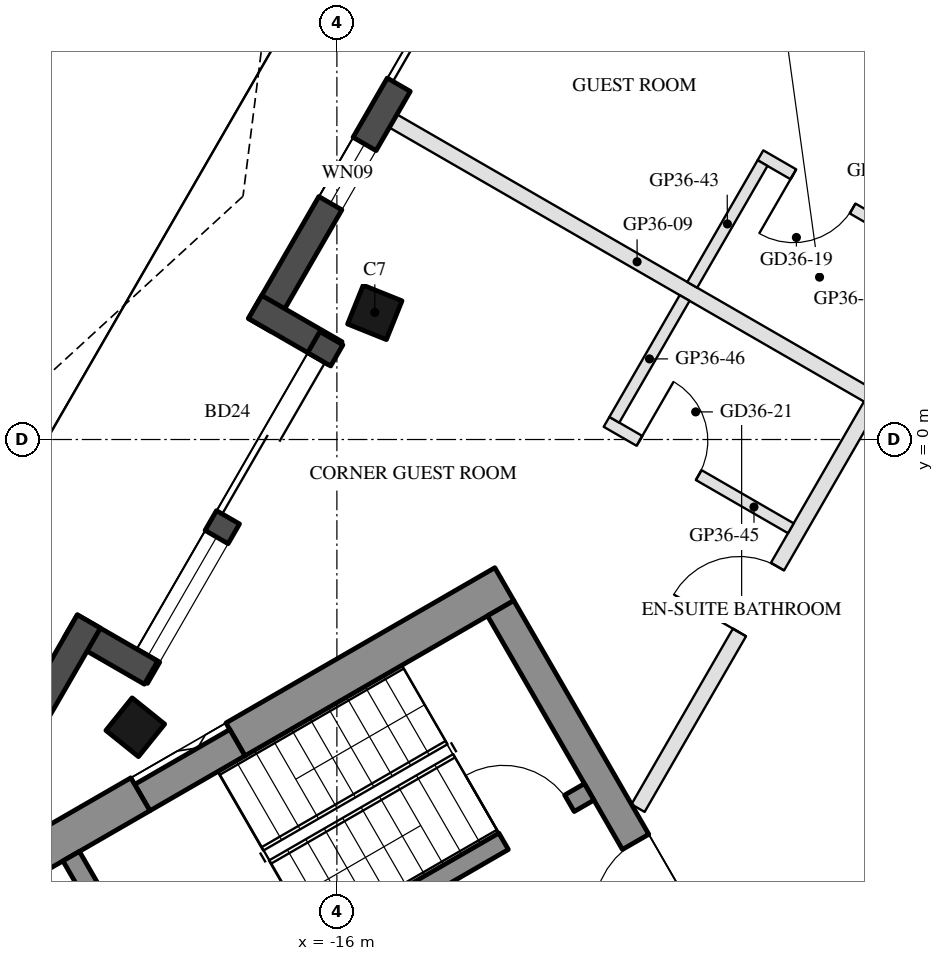
"""IFC4 building model, lengths in metres.
Left out: names, types, materials, properties, quantities, classifications, styles, units other than length and angle.
Written with IfcOpenShell. Run it as: python <this file> out.ifc"""

import sys

from ifc_helpers import new_model, si_unit, direction, frame, frame_2d, origin, origin_2d, place, context, subcontext, project, spatial, rectangle, hollow_rectangle, extrude, boolean, halfspace, element, fill, save


model = new_model("IFC4")
c1 = context("Model", 3, precision=1e-05, world=origin(), true_north=direction((0.0, 1.0)))
c2 = subcontext(c1, "Body", "Model", "MODEL_VIEW")
j1 = project(units=[si_unit("LENGTHUNIT", "METRE"), si_unit("PLANEANGLEUNIT", "RADIAN")], contexts=[c1])
p1 = place(None, origin())
s1 = spatial("IfcSite", under=j1, at=p1, CompositionType="ELEMENT")
p2 = place(p1, origin())
s2 = spatial("IfcBuilding", under=s1, at=p2, CompositionType="ELEMENT")
p3 = place(p2, frame((0.0, 0.0, 328.1)))
s3 = spatial("IfcBuildingStorey", under=s2, at=p3, CompositionType="ELEMENT", Elevation=328.1)
p4 = place(p3, frame((-15.501, 1.672, 0.0), z_axis=(0.161451925123, -0.022915757114, 0.986614485982), x_axis=(-0.495072298274, -0.866715969634, 0.060883885081)))
e1 = element("IfcColumn", 1, at=p4, inside=s3, PredefinedType="COLUMN", context=c2, shape_type="SweptSolid", body=[
    boolean("DIFFERENCE", boolean("DIFFERENCE", extrude(hollow_rectangle(XDim=0.55, YDim=0.55, WallThickness=0.025, at=origin_2d()), origin(), (0.0, 0.0, 1.0), 3.75), halfspace(frame((0.0, 0.0, 0.034), z_axis=(0.0, 0.0, 1.0), x_axis=(1.0, 0.0, 0.0)), True)), halfspace(frame((0.0, 0.0, 3.735), z_axis=(0.0, 0.0, 1.0), x_axis=(1.0, 0.0, 0.0)), False)),
])
p5 = place(p3, frame((-18.652, -3.786, 0.0), z_axis=(0.190735837279, 0.02958801006, 0.981195388309), x_axis=(-0.488607938484, -0.864067297741, 0.121037132421)))
e2 = element("IfcColumn", 2, at=p5, inside=s3, PredefinedType="COLUMN", context=c2, shape_type="SweptSolid", body=[
    boolean("DIFFERENCE", boolean("DIFFERENCE", extrude(hollow_rectangle(XDim=0.55, YDim=0.55, WallThickness=0.025, at=origin_2d()), origin(), (0.0, 0.0, 1.0), 3.771), halfspace(frame((0.0, 0.0, 0.04), z_axis=(0.0, 0.0, 1.0), x_axis=(1.0, 0.0, 0.0)), True)), halfspace(frame((0.0, 0.0, 3.753), z_axis=(0.0, 0.0, 1.0), x_axis=(1.0, 0.0, 0.0)), False)),
])
p6 = place(p3, frame((-12.961, 8.522, 0.0), z_axis=(0.0, 0.0, 1.0), x_axis=(-0.499995447853, -0.866028031952, 0.0)))
e3 = element("IfcWall", 3, at=p6, inside=s3, PredefinedType="SOLIDWALL", context=c2, shape_type="SweptSolid", body=[
    extrude(rectangle(XDim=8.103, YDim=0.35, at=frame_2d((4.051, 0.0))), origin(), (0.0, 0.0, 1.0), 3.45),
])
p7 = place(p6, frame((2.95, 0.0, 0.0)))
e4 = element("IfcOpeningElement", 4, at=p7, cuts=e3, PredefinedType="OPENING", context=c2, shape_type="SweptSolid", body=[
    extrude(rectangle(XDim=1.5, YDim=2.4, at=frame_2d((0.75, 1.2))), frame((0.0, 0.185, 0.0), z_axis=(0.0, -1.0, 0.0), x_axis=(1.0, 0.0, 0.0)), (0.0, 0.0, 1.0), 0.37),
])
p8 = place(p6, frame((1.528, 0.0, 0.3)))
e5 = element("IfcOpeningElement", 5, at=p8, cuts=e3, PredefinedType="OPENING", context=c2, shape_type="SweptSolid", body=[
    extrude(rectangle(XDim=1.1, YDim=2.65, at=frame_2d((0.55, 1.325))), frame((0.0, 0.185, 0.0), z_axis=(0.0, -1.0, 0.0), x_axis=(1.0, 0.0, 0.0)), (0.0, 0.0, 1.0), 0.37),
])
p9 = place(p6, frame((5.35, 0.0, 0.3)))
e6 = element("IfcOpeningElement", 6, at=p9, cuts=e3, PredefinedType="OPENING", context=c2, shape_type="SweptSolid", body=[
    extrude(rectangle(XDim=0.9, YDim=2.65, at=frame_2d((0.45, 1.325))), frame((0.0, 0.185, 0.0), z_axis=(0.0, -1.0, 0.0), x_axis=(1.0, 0.0, 0.0)), (0.0, 0.0, 1.0), 0.37),
])
p10 = place(p3, frame((-17.076, 1.744, 0.0), z_axis=(0.0, 0.0, 1.0), x_axis=(0.866005645448, -0.500034220881, 0.0)))
e7 = element("IfcWall", 7, at=p10, inside=s3, PredefinedType="SOLIDWALL", context=c2, shape_type="SweptSolid", body=[
    extrude(rectangle(XDim=1.22, YDim=0.35, at=frame_2d((0.61, 0.0))), origin(), (0.0, 0.0, 1.0), 3.45),
])
p11 = place(p3, frame((-16.073, 1.333, 0.0), z_axis=(0.0, 0.0, 1.0), x_axis=(-0.499999159329, -0.866025889145, 0.0)))
e8 = element("IfcWall", 8, at=p11, inside=s3, PredefinedType="SOLIDWALL", context=c2, shape_type="SweptSolid", body=[
    extrude(rectangle(XDim=5.143, YDim=0.35, at=frame_2d((2.571, 0.0))), origin(), (0.0, 0.0, 1.0), 3.45),
])
p12 = place(p11, frame((0.32, 0.0, 0.0)))
e9 = element("IfcOpeningElement", 9, at=p12, cuts=e8, PredefinedType="OPENING", context=c2, shape_type="SweptSolid", body=[
    extrude(rectangle(XDim=2.4, YDim=2.4, at=frame_2d((1.2, 1.2))), frame((0.0, 0.185, 0.0), z_axis=(0.0, -1.0, 0.0), x_axis=(1.0, 0.0, 0.0)), (0.0, 0.0, 1.0), 0.37),
])
p13 = place(p11, frame((3.02, 0.0, 0.3)))
e10 = element("IfcOpeningElement", 10, at=p13, cuts=e8, PredefinedType="OPENING", context=c2, shape_type="SweptSolid", body=[
    extrude(rectangle(XDim=1.8, YDim=2.65, at=frame_2d((0.9, 1.325))), frame((0.0, 0.185, 0.0), z_axis=(0.0, -1.0, 0.0), x_axis=(1.0, 0.0, 0.0)), (0.0, 0.0, 1.0), 0.37),
])
p14 = place(p3, frame((-18.446, -3.068, 0.0), z_axis=(0.0, 0.0, 1.0), x_axis=(-0.866005645448, 0.500034220881, 0.0)))
e11 = element("IfcWall", 11, at=p14, inside=s3, PredefinedType="SOLIDWALL", context=c2, shape_type="SweptSolid", body=[
    extrude(rectangle(XDim=1.22, YDim=0.35, at=frame_2d((0.61, 0.0))), origin(), (0.0, 0.0, 1.0), 3.45),
])
p15 = place(p3, frame((-19.263, -2.394, 0.0), z_axis=(0.0, 0.0, 1.0), x_axis=(-0.500022895934, -0.866012184407, 0.0)))
e12 = element("IfcWall", 12, at=p15, inside=s3, PredefinedType="SOLIDWALL", context=c2, shape_type="SweptSolid", body=[
    extrude(rectangle(XDim=3.306, YDim=0.35, at=frame_2d((1.653, 0.0))), origin(), (0.0, 0.0, 1.0), 3.45),
])
p16 = place(p15, frame((1.43, 0.0, 0.3)))
e13 = element("IfcOpeningElement", 13, at=p16, cuts=e12, PredefinedType="OPENING", context=c2, shape_type="SweptSolid", body=[
    extrude(rectangle(XDim=1.4, YDim=2.65, at=frame_2d((0.7, 1.325))), frame((0.0, 0.185, 0.0), z_axis=(0.0, -1.0, 0.0), x_axis=(1.0, 0.0, 0.0)), (0.0, 0.0, 1.0), 0.37),
])
p17 = place(p3, frame((-13.797, -1.903, 0.0), z_axis=(0.0, 0.0, 1.0), x_axis=(-0.866020367552, -0.500008722908, 0.0)))
e14 = element("IfcWall", 14, at=p17, inside=s3, PredefinedType="SHEAR", context=c2, shape_type="SweptSolid", body=[
    extrude(rectangle(XDim=4.085, YDim=0.5, at=frame_2d((2.042, 0.0))), origin(), (0.0, 0.0, 1.0), 3.45),
])
p18 = place(p3, frame((-17.309, -3.989, 0.0), z_axis=(0.0, 0.0, 1.0), x_axis=(-0.866092727722, -0.499883373386, 0.0)))
e15 = element("IfcWall", 15, at=p18, inside=s3, PredefinedType="SHEAR", context=c2, shape_type="SweptSolid", body=[
    extrude(rectangle(XDim=1.445, YDim=0.4, at=frame_2d((0.722, 0.0))), origin(), (0.0, 0.0, 1.0), 3.45),
])
p19 = place(p3, frame((-18.585, -4.668, 0.0), z_axis=(0.0, 0.0, 1.0), x_axis=(-0.866034122891, -0.49998489776, 0.0)))
e16 = element("IfcWall", 16, at=p19, inside=s3, PredefinedType="SHEAR", context=c2, shape_type="SweptSolid", body=[
    extrude(rectangle(XDim=2.738, YDim=0.5, at=frame_2d((1.369, 0.0))), origin(), (0.0, 0.0, 1.0), 3.45),
])
p20 = place(p3, frame((-13.845, -2.22, 0.0), z_axis=(0.0, 0.0, 1.0), x_axis=(0.500004234368, -0.866022959057, 0.0)))
e17 = element("IfcWall", 17, at=p20, inside=s3, PredefinedType="SHEAR", context=c2, shape_type="SweptSolid", body=[
    extrude(rectangle(XDim=10.0, YDim=0.4, at=frame_2d((5.0, 0.0))), origin(), (0.0, 0.0, 1.0), 3.45),
])
p21 = place(p20, frame((3.55, 0.0, 0.0)))
e18 = element("IfcOpeningElement", 18, at=p21, cuts=e17, PredefinedType="OPENING", context=c2, shape_type="SweptSolid", body=[
    extrude(rectangle(XDim=1.1, YDim=2.1, at=frame_2d((0.55, 1.05))), frame((0.0, 0.21, 0.0), z_axis=(0.0, -1.0, 0.0), x_axis=(1.0, 0.0, 0.0)), (0.0, 0.0, 1.0), 0.42),
])
p22 = place(p20, frame((5.85, 0.0, 0.0)))
e19 = element("IfcOpeningElement", 19, at=p22, cuts=e17, PredefinedType="OPENING", context=c2, shape_type="SweptSolid", body=[
    extrude(rectangle(XDim=1.4, YDim=2.1, at=frame_2d((0.7, 1.05))), frame((0.0, 0.21, 0.0), z_axis=(0.0, -1.0, 0.0), x_axis=(1.0, 0.0, 0.0)), (0.0, 0.0, 1.0), 0.42),
])
p23 = place(p3, frame((-12.681, -4.636, 0.0), z_axis=(0.0, 0.0, 1.0), x_axis=(-0.866021702275, -0.500006411147, 0.0)))
e20 = element("IfcWall", 20, at=p23, inside=s3, PredefinedType="SHEAR", context=c2, shape_type="SweptSolid", body=[
    extrude(rectangle(XDim=6.45, YDim=0.25, at=frame_2d((3.225, 0.0))), origin(), (0.0, 0.0, 1.0), 3.45),
])
p24 = place(p23, frame((0.3, 0.0, 0.0)))
e21 = element("IfcOpeningElement", 21, at=p24, cuts=e20, PredefinedType="OPENING", context=c2, shape_type="SweptSolid", body=[
    extrude(rectangle(XDim=1.0, YDim=2.1, at=frame_2d((0.5, 1.05))), frame((0.0, 0.135, 0.0), z_axis=(0.0, -1.0, 0.0), x_axis=(1.0, 0.0, 0.0)), (0.0, 0.0, 1.0), 0.27),
])
p25 = place(p3, frame((-19.496, -5.482, 0.0), z_axis=(0.0, 0.0, 1.0), x_axis=(0.499990435942, -0.866030925526, 0.0)))
e22 = element("IfcWall", 22, at=p25, inside=s3, PredefinedType="SHEAR", context=c2, shape_type="SweptSolid", body=[
    extrude(rectangle(XDim=2.55, YDim=0.25, at=frame_2d((1.275, 0.0))), origin(), (0.0, 0.0, 1.0), 3.45),
])
p26 = place(p3, frame((-11.592, 6.753, 0.0), z_axis=(0.0, 0.0, 1.0), x_axis=(0.879564392882, -0.475779863776, 0.0)))
e23 = element("IfcWall", 23, at=p26, inside=s3, PredefinedType="PARTITIONING", context=c2, shape_type="SweptSolid", body=[
    extrude(rectangle(XDim=5.517, YDim=0.2, at=frame_2d((2.759, 0.0))), origin(), (0.0, 0.0, 1.0), 3.05),
])
p27 = place(p3, frame((-15.259, 4.191, 0.0), z_axis=(0.0, 0.0, 1.0), x_axis=(0.866022643759, -0.500004780474, 0.0)))
e24 = element("IfcWall", 24, at=p27, inside=s3, PredefinedType="PARTITIONING", context=c2, shape_type="SweptSolid", body=[
    extrude(rectangle(XDim=7.411, YDim=0.2, at=frame_2d((3.705, 0.0))), origin(), (0.0, 0.0, 1.0), 3.05),
])
p28 = place(p3, frame((-8.002, 2.34, 0.0), z_axis=(0.0, 0.0, 1.0), x_axis=(-0.866056369097, 0.49994636267, 0.0)))
e25 = element("IfcWall", 25, at=p28, inside=s3, PredefinedType="PARTITIONING", context=c2, shape_type="SweptSolid", body=[
    extrude(rectangle(XDim=2.8, YDim=0.15, at=frame_2d((1.4, 0.0))), origin(), (0.0, 0.0, 1.0), 3.45),
])
p29 = place(p28, frame((1.4, 0.0, 0.0)))
e26 = element("IfcOpeningElement", 26, at=p29, cuts=e25, PredefinedType="OPENING", context=c2, shape_type="SweptSolid", body=[
    extrude(rectangle(XDim=0.9, YDim=2.1, at=frame_2d((0.45, 1.05))), frame((0.0, 0.085, 0.0), z_axis=(0.0, -1.0, 0.0), x_axis=(1.0, 0.0, 0.0)), (0.0, 0.0, 1.0), 0.17),
])
p30 = place(p3, frame((-10.4, 3.637, 0.0), z_axis=(0.0, 0.0, 1.0), x_axis=(-0.499985172903, -0.866033964044, 0.0)))
e27 = element("IfcWall", 27, at=p30, inside=s3, PredefinedType="PARTITIONING", context=c2, shape_type="SweptSolid", body=[
    extrude(rectangle(XDim=1.85, YDim=0.15, at=frame_2d((0.925, 0.0))), origin(), (0.0, 0.0, 1.0), 3.05),
])
p31 = place(p3, frame((-12.038, -4.85, 0.0), z_axis=(0.0, 0.0, 1.0), x_axis=(0.500001049025, 0.866024798128, 0.0)))
e28 = element("IfcWall", 28, at=p31, inside=s3, PredefinedType="PARTITIONING", context=c2, shape_type="SweptSolid", body=[
    extrude(rectangle(XDim=6.119, YDim=0.2, at=frame_2d((3.06, 0.0))), origin(), (0.0, 0.0, 1.0), 3.05),
])
p32 = place(p31, frame((2.669, 0.0, 0.0)))
e29 = element("IfcOpeningElement", 29, at=p32, cuts=e28, PredefinedType="OPENING", context=c2, shape_type="SweptSolid", body=[
    extrude(rectangle(XDim=1.0, YDim=2.1, at=frame_2d((0.5, 1.05))), frame((0.0, 0.11, 0.0), z_axis=(0.0, -1.0, 0.0), x_axis=(1.0, 0.0, 0.0)), (0.0, 0.0, 1.0), 0.22),
])
p33 = place(p3, frame((-12.452, 0.232, 0.0), z_axis=(0.0, 0.0, 1.0), x_axis=(0.866034573852, -0.49998411664, 0.0)))
e30 = element("IfcWall", 30, at=p33, inside=s3, PredefinedType="PARTITIONING", context=c2, shape_type="SweptSolid", body=[
    extrude(rectangle(XDim=2.8, YDim=0.15, at=frame_2d((1.4, 0.0))), origin(), (0.0, 0.0, 1.0), 3.05),
])
p34 = place(p33, frame((0.5, 0.0, 0.0)))
e31 = element("IfcOpeningElement", 31, at=p34, cuts=e30, PredefinedType="OPENING", context=c2, shape_type="SweptSolid", body=[
    extrude(rectangle(XDim=0.9, YDim=2.1, at=frame_2d((0.45, 1.05))), frame((0.0, 0.085, 0.0), z_axis=(0.0, -1.0, 0.0), x_axis=(1.0, 0.0, 0.0)), (0.0, 0.0, 1.0), 0.17),
])
p35 = place(p3, frame((-11.425, 1.862, 0.0), z_axis=(0.0, 0.0, 1.0), x_axis=(-0.499886193382, -0.866091100096, 0.0)))
e32 = element("IfcWall", 32, at=p35, inside=s3, PredefinedType="PARTITIONING", context=c2, shape_type="SweptSolid", body=[
    extrude(rectangle(XDim=1.85, YDim=0.15, at=frame_2d((0.925, 0.0))), origin(), (0.0, 0.0, 1.0), 3.45),
])
p36 = place(p7, frame((1.5, 0.0, 0.0), z_axis=(0.0, 0.0, 1.0), x_axis=(-1.0, 0.0, 0.0)))
e33 = element("IfcDoor", 33, at=p36, inside=s3, OperationType="SLIDING_TO_LEFT", PredefinedType="DOOR", context=c2, shape_type="SweptSolid", body=[
    extrude(rectangle(XDim=1.5, YDim=2.4, at=frame_2d((0.75, 1.2))), frame((0.0, 0.025, 0.0), z_axis=(0.0, -1.0, 0.0), x_axis=(1.0, 0.0, 0.0)), (0.0, 0.0, 1.0), 0.05),
])
fill(e4, e33)
p37 = place(p9, origin())
e34 = element("IfcWindow", 34, at=p37, inside=s3, PartitioningType="SINGLE_PANEL", PredefinedType="WINDOW", context=c2, shape_type="SweptSolid", body=[
    extrude(rectangle(XDim=0.9, YDim=2.65, at=frame_2d((0.45, 1.325))), frame((0.0, 0.03, 0.0), z_axis=(0.0, -1.0, 0.0), x_axis=(1.0, 0.0, 0.0)), (0.0, 0.0, 1.0), 0.06),
])
fill(e6, e34)
p38 = place(p12, frame((2.4, 0.0, 0.0), z_axis=(0.0, 0.0, 1.0), x_axis=(-1.0, 0.0, 0.0)))
e35 = element("IfcDoor", 35, at=p38, inside=s3, OperationType="SLIDING_TO_LEFT", PredefinedType="DOOR", context=c2, shape_type="SweptSolid", body=[
    extrude(rectangle(XDim=2.4, YDim=2.4, at=frame_2d((1.2, 1.2))), frame((0.0, 0.025, 0.0), z_axis=(0.0, -1.0, 0.0), x_axis=(1.0, 0.0, 0.0)), (0.0, 0.0, 1.0), 0.05),
])
fill(e9, e35)
p39 = place(p13, origin())
e36 = element("IfcWindow", 36, at=p39, inside=s3, PartitioningType="SINGLE_PANEL", PredefinedType="WINDOW", context=c2, shape_type="SweptSolid", body=[
    extrude(rectangle(XDim=1.8, YDim=2.65, at=frame_2d((0.9, 1.325))), frame((0.0, 0.03, 0.0), z_axis=(0.0, -1.0, 0.0), x_axis=(1.0, 0.0, 0.0)), (0.0, 0.0, 1.0), 0.06),
])
fill(e10, e36)
p40 = place(p21, frame((1.1, 0.0, 0.0), z_axis=(0.0, 0.0, 1.0), x_axis=(-1.0, 0.0, 0.0)))
e37 = element("IfcDoor", 37, at=p40, inside=s3, OperationType="SINGLE_SWING_LEFT", PredefinedType="DOOR", context=c2, shape_type="SweptSolid", body=[
    extrude(rectangle(XDim=1.1, YDim=2.1, at=frame_2d((0.55, 1.05))), frame((0.0, 0.025, 0.0), z_axis=(0.0, -1.0, 0.0), x_axis=(1.0, 0.0, 0.0)), (0.0, 0.0, 1.0), 0.05),
])
fill(e18, e37)
p41 = place(p24, frame((1.0, 0.0, 0.0), z_axis=(0.0, 0.0, 1.0), x_axis=(-1.0, 0.0, 0.0)))
e38 = element("IfcDoor", 38, at=p41, inside=s3, OperationType="SINGLE_SWING_LEFT", PredefinedType="DOOR", context=c2, shape_type="SweptSolid", body=[
    extrude(rectangle(XDim=1.0, YDim=2.1, at=frame_2d((0.5, 1.05))), frame((0.0, 0.025, 0.0), z_axis=(0.0, -1.0, 0.0), x_axis=(1.0, 0.0, 0.0)), (0.0, 0.0, 1.0), 0.05),
])
fill(e21, e38)
p42 = place(p29, origin())
e39 = element("IfcDoor", 39, at=p42, inside=s3, OperationType="SINGLE_SWING_RIGHT", PredefinedType="DOOR", context=c2, shape_type="SweptSolid", body=[
    extrude(rectangle(XDim=0.9, YDim=2.1, at=frame_2d((0.45, 1.05))), frame((0.0, 0.025, 0.0), z_axis=(0.0, -1.0, 0.0), x_axis=(1.0, 0.0, 0.0)), (0.0, 0.0, 1.0), 0.05),
])
fill(e26, e39)
p43 = place(p34, origin())
e40 = element("IfcDoor", 40, at=p43, inside=s3, OperationType="SINGLE_SWING_LEFT", PredefinedType="DOOR", context=c2, shape_type="SweptSolid", body=[
    extrude(rectangle(XDim=0.9, YDim=2.1, at=frame_2d((0.45, 1.05))), frame((0.0, 0.025, 0.0), z_axis=(0.0, -1.0, 0.0), x_axis=(1.0, 0.0, 0.0)), (0.0, 0.0, 1.0), 0.05),
])
fill(e31, e40)
p44 = place(p32, origin())
e41 = element("IfcDoor", 41, at=p44, inside=s3, OperationType="SINGLE_SWING_LEFT", PredefinedType="DOOR", context=c2, shape_type="SweptSolid", body=[
    extrude(rectangle(XDim=1.0, YDim=2.1, at=frame_2d((0.5, 1.05))), frame((0.0, 0.025, 0.0), z_axis=(0.0, -1.0, 0.0), x_axis=(1.0, 0.0, 0.0)), (0.0, 0.0, 1.0), 0.05),
])
fill(e29, e41)
save(model, sys.argv[1])
